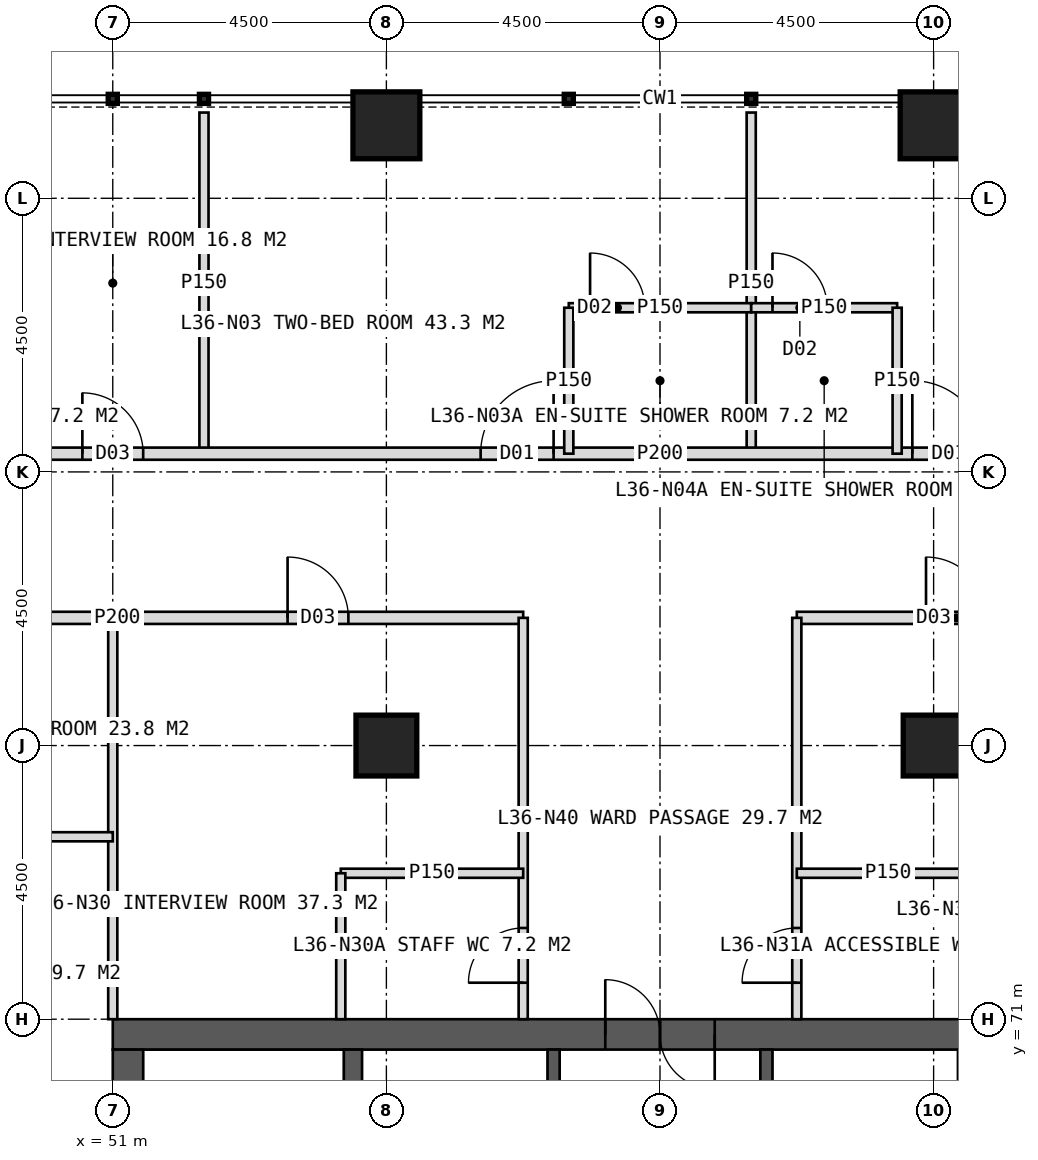
"""IFC4 building model, lengths in metres.
Left out: names, types, materials, properties, quantities, classifications, styles, units other than length and angle.
Written with IfcOpenShell. Run it as: python <this file> out.ifc"""

import sys

from ifc_helpers import new_model, si_unit, direction, frame, frame_2d, origin, origin_2d, place, context, subcontext, project, spatial, rectangle, hollow_rectangle, extrude, element, fill, save


model = new_model("IFC4")
c1 = context("Model", 3, precision=1e-05, world=origin(), true_north=direction((0.0, 1.0)))
c2 = subcontext(c1, "Body", "Model", "MODEL_VIEW")
j1 = project(units=[si_unit("LENGTHUNIT", "METRE"), si_unit("PLANEANGLEUNIT", "RADIAN")], contexts=[c1])
p1 = place(None, origin())
s1 = spatial("IfcSite", under=j1, at=p1, CompositionType="ELEMENT")
p2 = place(p1, origin())
s2 = spatial("IfcBuilding", under=s1, at=p2, CompositionType="ELEMENT")
p3 = place(p2, frame((0.0, 0.0, 152.0)))
s3 = spatial("IfcBuildingStorey", under=s2, at=p3, CompositionType="ELEMENT", Elevation=152.0)
p4 = place(p3, frame((51.0, 70.75, 0.0), z_axis=(0.0, 0.0, 1.0), x_axis=(1.0, 0.0, 0.0)))
e1 = element("IfcWall", 1, at=p4, inside=s3, PredefinedType="SHEAR", context=c2, shape_type="SweptSolid", body=[
    extrude(rectangle(XDim=18.0, YDim=0.5, at=frame_2d((9.0, 0.0))), origin(), (0.0, 0.0, 1.0), 4.0),
])
p5 = place(p4, frame((8.1, 0.0, 0.0)))
e2 = element("IfcOpeningElement", 2, at=p5, cuts=e1, PredefinedType="OPENING", context=c2, shape_type="SweptSolid", body=[
    extrude(rectangle(XDim=1.8, YDim=2.2, at=frame_2d((0.9, 1.1))), frame((0.0, 0.26, 0.0), z_axis=(0.0, -1.0, 0.0), x_axis=(1.0, 0.0, 0.0)), (0.0, 0.0, 1.0), 0.52),
])
p6 = place(p3, frame((51.25, 53.5, 0.0), z_axis=(0.0, 0.0, 1.0), x_axis=(0.0, 1.0, 0.0)))
e3 = element("IfcWall", 3, at=p6, inside=s3, PredefinedType="SHEAR", context=c2, shape_type="SweptSolid", body=[
    extrude(rectangle(XDim=17.0, YDim=0.5, at=frame_2d((8.5, 0.0))), origin(), (0.0, 0.0, 1.0), 4.0),
])
p7 = place(p6, frame((6.0, 0.0, 0.0)))
e4 = element("IfcOpeningElement", 4, at=p7, cuts=e3, PredefinedType="OPENING", context=c2, shape_type="SweptSolid", body=[
    extrude(rectangle(XDim=1.5, YDim=2.2, at=frame_2d((0.75, 1.1))), frame((0.0, 0.26, 0.0), z_axis=(0.0, -1.0, 0.0), x_axis=(1.0, 0.0, 0.0)), (0.0, 0.0, 1.0), 0.52),
])
p8 = place(p3, frame((54.95, 53.5, 0.0), z_axis=(0.0, 0.0, 1.0), x_axis=(0.0, 1.0, 0.0)))
e5 = element("IfcWall", 5, at=p8, inside=s3, PredefinedType="SHEAR", context=c2, shape_type="SweptSolid", body=[
    extrude(rectangle(XDim=17.0, YDim=0.3, at=frame_2d((8.5, 0.0))), origin(), (0.0, 0.0, 1.0), 4.0),
])
p9 = place(p3, frame((58.25, 53.5, 0.0), z_axis=(0.0, 0.0, 1.0), x_axis=(0.0, 1.0, 0.0)))
e6 = element("IfcWall", 6, at=p9, inside=s3, PredefinedType="SHEAR", context=c2, shape_type="SweptSolid", body=[
    extrude(rectangle(XDim=17.0, YDim=0.2, at=frame_2d((8.5, 0.0))), origin(), (0.0, 0.0, 1.0), 4.0),
])
p10 = place(p9, frame((1.375, 0.0, 0.0)))
e7 = element("IfcOpeningElement", 7, at=p10, cuts=e6, PredefinedType="OPENING", context=c2, shape_type="SweptSolid", body=[
    extrude(rectangle(XDim=1.4, YDim=2.2, at=frame_2d((0.7, 1.1))), frame((0.0, 0.11, 0.0), z_axis=(0.0, -1.0, 0.0), x_axis=(1.0, 0.0, 0.0)), (0.0, 0.0, 1.0), 0.22),
])
p11 = place(p9, frame((5.675, 0.0, 0.0)))
e8 = element("IfcOpeningElement", 8, at=p11, cuts=e6, PredefinedType="OPENING", context=c2, shape_type="SweptSolid", body=[
    extrude(rectangle(XDim=1.4, YDim=2.2, at=frame_2d((0.7, 1.1))), frame((0.0, 0.11, 0.0), z_axis=(0.0, -1.0, 0.0), x_axis=(1.0, 0.0, 0.0)), (0.0, 0.0, 1.0), 0.22),
])
p12 = place(p3, frame((61.75, 53.5, 0.0), z_axis=(0.0, 0.0, 1.0), x_axis=(0.0, 1.0, 0.0)))
e9 = element("IfcWall", 9, at=p12, inside=s3, PredefinedType="SHEAR", context=c2, shape_type="SweptSolid", body=[
    extrude(rectangle(XDim=17.0, YDim=0.2, at=frame_2d((8.5, 0.0))), origin(), (0.0, 0.0, 1.0), 4.0),
])
p13 = place(p12, frame((1.375, 0.0, 0.0)))
e10 = element("IfcOpeningElement", 10, at=p13, cuts=e9, PredefinedType="OPENING", context=c2, shape_type="SweptSolid", body=[
    extrude(rectangle(XDim=1.4, YDim=2.2, at=frame_2d((0.7, 1.1))), frame((0.0, 0.11, 0.0), z_axis=(0.0, -1.0, 0.0), x_axis=(1.0, 0.0, 0.0)), (0.0, 0.0, 1.0), 0.22),
])
p14 = place(p12, frame((5.675, 0.0, 0.0)))
e11 = element("IfcOpeningElement", 11, at=p14, cuts=e9, PredefinedType="OPENING", context=c2, shape_type="SweptSolid", body=[
    extrude(rectangle(XDim=1.4, YDim=2.2, at=frame_2d((0.7, 1.1))), frame((0.0, 0.11, 0.0), z_axis=(0.0, -1.0, 0.0), x_axis=(1.0, 0.0, 0.0)), (0.0, 0.0, 1.0), 0.22),
])
for number, where, z_axis, x_axis in (
    (12, (55.5, 75.5, 0.0), (0.0, 0.0, 1.0), (1.0, 0.0, 0.0)),
    (13, (64.5, 75.5, 0.0), (0.0, 0.0, 1.0), (1.0, 0.0, 0.0)),
):
    element("IfcColumn", number, at=place(p3, frame(where, z_axis=z_axis, x_axis=x_axis)), inside=s3, PredefinedType="COLUMN", context=c2, shape_type="SweptSolid", body=[
        extrude(hollow_rectangle(XDim=1.0, YDim=1.0, WallThickness=0.1, at=origin_2d()), origin(), (0.0, 0.0, 1.0), 4.0),
    ])
for number, where, z_axis, x_axis in (
    (14, (55.5, 85.7, 0.0), (0.0, 0.0, 1.0), (1.0, 0.0, 0.0)),
    (15, (64.5, 85.7, 0.0), (0.0, 0.0, 1.0), (1.0, 0.0, 0.0)),
):
    element("IfcColumn", number, at=place(p3, frame(where, z_axis=z_axis, x_axis=x_axis)), inside=s3, PredefinedType="COLUMN", context=c2, shape_type="SweptSolid", body=[
        extrude(hollow_rectangle(XDim=1.1, YDim=1.1, WallThickness=0.1, at=origin_2d()), origin(), (0.0, 0.0, 1.0), 4.0),
    ])
for number, where, z_axis, x_axis in (
    (16, (52.5, 80.3, 0.0), (0.0, 0.0, 1.0), (0.0, 1.0, 0.0)),
    (17, (61.5, 80.3, 0.0), (0.0, 0.0, 1.0), (0.0, 1.0, 0.0)),
):
    element("IfcWall", number, at=place(p3, frame(where, z_axis=z_axis, x_axis=x_axis)), inside=s3, PredefinedType="PARTITIONING", context=c2, shape_type="SweptSolid", body=[
        extrude(rectangle(XDim=5.61, YDim=0.15, at=frame_2d((2.805, 0.0))), origin(), (0.0, 0.0, 1.0), 3.75),
    ])
p15 = place(p3, frame((41.7, 80.3, 0.0), z_axis=(0.0, 0.0, 1.0), x_axis=(1.0, 0.0, 0.0)))
e18 = element("IfcWall", 18, at=p15, inside=s3, PredefinedType="PARTITIONING", context=c2, shape_type="SweptSolid", body=[
    extrude(rectangle(XDim=36.6, YDim=0.2, at=frame_2d((18.3, 0.0))), origin(), (0.0, 0.0, 1.0), 3.75),
])
p16 = place(p15, frame((3.35, 0.0, 0.0)))
e19 = element("IfcOpeningElement", 19, at=p16, cuts=e18, PredefinedType="OPENING", context=c2, shape_type="SweptSolid", body=[
    extrude(rectangle(XDim=1.2, YDim=2.2, at=frame_2d((0.6, 1.1))), frame((0.0, 0.11, 0.0), z_axis=(0.0, -1.0, 0.0), x_axis=(1.0, 0.0, 0.0)), (0.0, 0.0, 1.0), 0.22),
])
p17 = place(p15, frame((8.8, 0.0, 0.0)))
e20 = element("IfcOpeningElement", 20, at=p17, cuts=e18, PredefinedType="OPENING", context=c2, shape_type="SweptSolid", body=[
    extrude(rectangle(XDim=1.0, YDim=2.1, at=frame_2d((0.5, 1.05))), frame((0.0, 0.11, 0.0), z_axis=(0.0, -1.0, 0.0), x_axis=(1.0, 0.0, 0.0)), (0.0, 0.0, 1.0), 0.22),
])
p18 = place(p15, frame((15.35, 0.0, 0.0)))
e21 = element("IfcOpeningElement", 21, at=p18, cuts=e18, PredefinedType="OPENING", context=c2, shape_type="SweptSolid", body=[
    extrude(rectangle(XDim=1.2, YDim=2.2, at=frame_2d((0.6, 1.1))), frame((0.0, 0.11, 0.0), z_axis=(0.0, -1.0, 0.0), x_axis=(1.0, 0.0, 0.0)), (0.0, 0.0, 1.0), 0.22),
])
p19 = place(p15, frame((22.45, 0.0, 0.0)))
e22 = element("IfcOpeningElement", 22, at=p19, cuts=e18, PredefinedType="OPENING", context=c2, shape_type="SweptSolid", body=[
    extrude(rectangle(XDim=1.2, YDim=2.2, at=frame_2d((0.6, 1.1))), frame((0.0, 0.11, 0.0), z_axis=(0.0, -1.0, 0.0), x_axis=(1.0, 0.0, 0.0)), (0.0, 0.0, 1.0), 0.22),
])
p20 = place(p3, frame((58.5, 82.7, 0.0), z_axis=(0.0, 0.0, 1.0), x_axis=(1.0, 0.0, 0.0)))
e23 = element("IfcWall", 23, at=p20, inside=s3, PredefinedType="PARTITIONING", context=c2, shape_type="SweptSolid", body=[
    extrude(rectangle(XDim=3.0, YDim=0.15, at=frame_2d((1.5, 0.0))), origin(), (0.0, 0.0, 1.0), 3.75),
])
p21 = place(p20, frame((0.35, 0.0, 0.0)))
e24 = element("IfcOpeningElement", 24, at=p21, cuts=e23, PredefinedType="OPENING", context=c2, shape_type="SweptSolid", body=[
    extrude(rectangle(XDim=0.9, YDim=2.1, at=frame_2d((0.45, 1.05))), frame((0.0, 0.085, 0.0), z_axis=(0.0, -1.0, 0.0), x_axis=(1.0, 0.0, 0.0)), (0.0, 0.0, 1.0), 0.17),
])
p22 = place(p3, frame((58.5, 80.3, 0.0), z_axis=(0.0, 0.0, 1.0), x_axis=(0.0, 1.0, 0.0)))
e25 = element("IfcWall", 25, at=p22, inside=s3, PredefinedType="PARTITIONING", context=c2, shape_type="SweptSolid", body=[
    extrude(rectangle(XDim=2.4, YDim=0.15, at=frame_2d((1.2, 0.0))), origin(), (0.0, 0.0, 1.0), 3.75),
])
p23 = place(p3, frame((61.5, 82.7, 0.0), z_axis=(0.0, 0.0, 1.0), x_axis=(1.0, 0.0, 0.0)))
e26 = element("IfcWall", 26, at=p23, inside=s3, PredefinedType="PARTITIONING", context=c2, shape_type="SweptSolid", body=[
    extrude(rectangle(XDim=2.4, YDim=0.15, at=frame_2d((1.2, 0.0))), origin(), (0.0, 0.0, 1.0), 3.75),
])
p24 = place(p23, frame((0.35, 0.0, 0.0)))
e27 = element("IfcOpeningElement", 27, at=p24, cuts=e26, PredefinedType="OPENING", context=c2, shape_type="SweptSolid", body=[
    extrude(rectangle(XDim=0.9, YDim=2.1, at=frame_2d((0.45, 1.05))), frame((0.0, 0.085, 0.0), z_axis=(0.0, -1.0, 0.0), x_axis=(1.0, 0.0, 0.0)), (0.0, 0.0, 1.0), 0.17),
])
p25 = place(p3, frame((63.9, 80.3, 0.0), z_axis=(0.0, 0.0, 1.0), x_axis=(0.0, 1.0, 0.0)))
e28 = element("IfcWall", 28, at=p25, inside=s3, PredefinedType="PARTITIONING", context=c2, shape_type="SweptSolid", body=[
    extrude(rectangle(XDim=2.4, YDim=0.15, at=frame_2d((1.2, 0.0))), origin(), (0.0, 0.0, 1.0), 3.75),
])
p26 = place(p3, frame((51.0, 71.0, 0.0), z_axis=(0.0, 0.0, 1.0), x_axis=(0.0, 1.0, 0.0)))
e29 = element("IfcWall", 29, at=p26, inside=s3, PredefinedType="PARTITIONING", context=c2, shape_type="SweptSolid", body=[
    extrude(rectangle(XDim=6.6, YDim=0.15, at=frame_2d((3.3, 0.0))), origin(), (0.0, 0.0, 1.0), 3.75),
])
p27 = place(p3, frame((44.4, 77.6, 0.0), z_axis=(0.0, 0.0, 1.0), x_axis=(1.0, 0.0, 0.0)))
e30 = element("IfcWall", 30, at=p27, inside=s3, PredefinedType="PARTITIONING", context=c2, shape_type="SweptSolid", body=[
    extrude(rectangle(XDim=13.35, YDim=0.2, at=frame_2d((6.675, 0.0))), origin(), (0.0, 0.0, 1.0), 3.75),
])
p28 = place(p27, frame((9.475, 0.0, 0.0)))
e31 = element("IfcOpeningElement", 31, at=p28, cuts=e30, PredefinedType="OPENING", context=c2, shape_type="SweptSolid", body=[
    extrude(rectangle(XDim=1.0, YDim=2.1, at=frame_2d((0.5, 1.05))), frame((0.0, 0.11, 0.0), z_axis=(0.0, -1.0, 0.0), x_axis=(1.0, 0.0, 0.0)), (0.0, 0.0, 1.0), 0.22),
])
p29 = place(p3, frame((62.25, 77.6, 0.0), z_axis=(0.0, 0.0, 1.0), x_axis=(1.0, 0.0, 0.0)))
e32 = element("IfcWall", 32, at=p29, inside=s3, PredefinedType="PARTITIONING", context=c2, shape_type="SweptSolid", body=[
    extrude(rectangle(XDim=6.75, YDim=0.2, at=frame_2d((3.375, 0.0))), origin(), (0.0, 0.0, 1.0), 3.75),
])
p30 = place(p29, frame((2.125, 0.0, 0.0)))
e33 = element("IfcOpeningElement", 33, at=p30, cuts=e32, PredefinedType="OPENING", context=c2, shape_type="SweptSolid", body=[
    extrude(rectangle(XDim=1.0, YDim=2.1, at=frame_2d((0.5, 1.05))), frame((0.0, 0.11, 0.0), z_axis=(0.0, -1.0, 0.0), x_axis=(1.0, 0.0, 0.0)), (0.0, 0.0, 1.0), 0.22),
])
p31 = place(p3, frame((57.75, 71.0, 0.0), z_axis=(0.0, 0.0, 1.0), x_axis=(0.0, 1.0, 0.0)))
e34 = element("IfcWall", 34, at=p31, inside=s3, PredefinedType="PARTITIONING", context=c2, shape_type="SweptSolid", body=[
    extrude(rectangle(XDim=6.6, YDim=0.15, at=frame_2d((3.3, 0.0))), origin(), (0.0, 0.0, 1.0), 3.75),
])
p32 = place(p31, frame((0.6, 0.0, 0.0)))
e35 = element("IfcOpeningElement", 35, at=p32, cuts=e34, PredefinedType="OPENING", context=c2, shape_type="SweptSolid", body=[
    extrude(rectangle(XDim=0.9, YDim=2.1, at=frame_2d((0.45, 1.05))), frame((0.0, 0.085, 0.0), z_axis=(0.0, -1.0, 0.0), x_axis=(1.0, 0.0, 0.0)), (0.0, 0.0, 1.0), 0.17),
])
p33 = place(p3, frame((62.25, 71.0, 0.0), z_axis=(0.0, 0.0, 1.0), x_axis=(0.0, 1.0, 0.0)))
e36 = element("IfcWall", 36, at=p33, inside=s3, PredefinedType="PARTITIONING", context=c2, shape_type="SweptSolid", body=[
    extrude(rectangle(XDim=6.6, YDim=0.15, at=frame_2d((3.3, 0.0))), origin(), (0.0, 0.0, 1.0), 3.75),
])
p34 = place(p33, frame((0.6, 0.0, 0.0)))
e37 = element("IfcOpeningElement", 37, at=p34, cuts=e36, PredefinedType="OPENING", context=c2, shape_type="SweptSolid", body=[
    extrude(rectangle(XDim=0.9, YDim=2.1, at=frame_2d((0.45, 1.05))), frame((0.0, 0.085, 0.0), z_axis=(0.0, -1.0, 0.0), x_axis=(1.0, 0.0, 0.0)), (0.0, 0.0, 1.0), 0.17),
])
p35 = place(p3, frame((54.75, 73.4, 0.0), z_axis=(0.0, 0.0, 1.0), x_axis=(1.0, 0.0, 0.0)))
e38 = element("IfcWall", 38, at=p35, inside=s3, PredefinedType="PARTITIONING", context=c2, shape_type="SweptSolid", body=[
    extrude(rectangle(XDim=3.0, YDim=0.15, at=frame_2d((1.5, 0.0))), origin(), (0.0, 0.0, 1.0), 3.75),
])
p36 = place(p3, frame((54.75, 71.0, 0.0), z_axis=(0.0, 0.0, 1.0), x_axis=(0.0, 1.0, 0.0)))
e39 = element("IfcWall", 39, at=p36, inside=s3, PredefinedType="PARTITIONING", context=c2, shape_type="SweptSolid", body=[
    extrude(rectangle(XDim=2.4, YDim=0.15, at=frame_2d((1.2, 0.0))), origin(), (0.0, 0.0, 1.0), 3.75),
])
p37 = place(p3, frame((62.25, 73.4, 0.0), z_axis=(0.0, 0.0, 1.0), x_axis=(1.0, 0.0, 0.0)))
e40 = element("IfcWall", 40, at=p37, inside=s3, PredefinedType="PARTITIONING", context=c2, shape_type="SweptSolid", body=[
    extrude(rectangle(XDim=3.0, YDim=0.15, at=frame_2d((1.5, 0.0))), origin(), (0.0, 0.0, 1.0), 3.75),
])
p38 = place(p3, frame((51.0, 74.0, 0.0), z_axis=(0.0, 0.0, 1.0), x_axis=(-1.0, 0.0, 0.0)))
e41 = element("IfcWall", 41, at=p38, inside=s3, PredefinedType="PARTITIONING", context=c2, shape_type="SweptSolid", body=[
    extrude(rectangle(XDim=6.6, YDim=0.15, at=frame_2d((3.3, 0.0))), origin(), (0.0, 0.0, 1.0), 3.75),
])
p39 = place(p17, origin())
e42 = element("IfcDoor", 42, at=p39, inside=s3, OperationType="SINGLE_SWING_LEFT", PredefinedType="DOOR", context=c2, shape_type="SweptSolid", body=[
    extrude(rectangle(XDim=1.0, YDim=2.1, at=frame_2d((0.5, 1.05))), frame((0.0, 0.025, 0.0), z_axis=(0.0, -1.0, 0.0), x_axis=(1.0, 0.0, 0.0)), (0.0, 0.0, 1.0), 0.05),
])
fill(e20, e42)
p40 = place(p18, origin())
e43 = element("IfcDoor", 43, at=p40, inside=s3, OperationType="SINGLE_SWING_RIGHT", PredefinedType="DOOR", context=c2, shape_type="SweptSolid", body=[
    extrude(rectangle(XDim=1.2, YDim=2.2, at=frame_2d((0.6, 1.1))), frame((0.0, 0.025, 0.0), z_axis=(0.0, -1.0, 0.0), x_axis=(1.0, 0.0, 0.0)), (0.0, 0.0, 1.0), 0.05),
])
fill(e21, e43)
p41 = place(p21, origin())
e44 = element("IfcDoor", 44, at=p41, inside=s3, OperationType="SINGLE_SWING_LEFT", PredefinedType="DOOR", context=c2, shape_type="SweptSolid", body=[
    extrude(rectangle(XDim=0.9, YDim=2.1, at=frame_2d((0.45, 1.05))), frame((0.0, 0.025, 0.0), z_axis=(0.0, -1.0, 0.0), x_axis=(1.0, 0.0, 0.0)), (0.0, 0.0, 1.0), 0.05),
])
fill(e24, e44)
p42 = place(p19, origin())
e45 = element("IfcDoor", 45, at=p42, inside=s3, OperationType="SINGLE_SWING_LEFT", PredefinedType="DOOR", context=c2, shape_type="SweptSolid", body=[
    extrude(rectangle(XDim=1.2, YDim=2.2, at=frame_2d((0.6, 1.1))), frame((0.0, 0.025, 0.0), z_axis=(0.0, -1.0, 0.0), x_axis=(1.0, 0.0, 0.0)), (0.0, 0.0, 1.0), 0.05),
])
fill(e22, e45)
p43 = place(p24, origin())
e46 = element("IfcDoor", 46, at=p43, inside=s3, OperationType="SINGLE_SWING_LEFT", PredefinedType="DOOR", context=c2, shape_type="SweptSolid", body=[
    extrude(rectangle(XDim=0.9, YDim=2.1, at=frame_2d((0.45, 1.05))), frame((0.0, 0.025, 0.0), z_axis=(0.0, -1.0, 0.0), x_axis=(1.0, 0.0, 0.0)), (0.0, 0.0, 1.0), 0.05),
])
fill(e27, e46)
p44 = place(p32, origin())
e47 = element("IfcDoor", 47, at=p44, inside=s3, OperationType="SINGLE_SWING_LEFT", PredefinedType="DOOR", context=c2, shape_type="SweptSolid", body=[
    extrude(rectangle(XDim=0.9, YDim=2.1, at=frame_2d((0.45, 1.05))), frame((0.0, 0.025, 0.0), z_axis=(0.0, -1.0, 0.0), x_axis=(1.0, 0.0, 0.0)), (0.0, 0.0, 1.0), 0.05),
])
fill(e35, e47)
p45 = place(p28, origin())
e48 = element("IfcDoor", 48, at=p45, inside=s3, OperationType="SINGLE_SWING_LEFT", PredefinedType="DOOR", context=c2, shape_type="SweptSolid", body=[
    extrude(rectangle(XDim=1.0, YDim=2.1, at=frame_2d((0.5, 1.05))), frame((0.0, 0.025, 0.0), z_axis=(0.0, -1.0, 0.0), x_axis=(1.0, 0.0, 0.0)), (0.0, 0.0, 1.0), 0.05),
])
fill(e31, e48)
p46 = place(p34, origin())
e49 = element("IfcDoor", 49, at=p46, inside=s3, OperationType="SINGLE_SWING_LEFT", PredefinedType="DOOR", context=c2, shape_type="SweptSolid", body=[
    extrude(rectangle(XDim=0.9, YDim=2.1, at=frame_2d((0.45, 1.05))), frame((0.0, 0.025, 0.0), z_axis=(0.0, -1.0, 0.0), x_axis=(1.0, 0.0, 0.0)), (0.0, 0.0, 1.0), 0.05),
])
fill(e37, e49)
p47 = place(p30, origin())
e50 = element("IfcDoor", 50, at=p47, inside=s3, OperationType="SINGLE_SWING_LEFT", PredefinedType="DOOR", context=c2, shape_type="SweptSolid", body=[
    extrude(rectangle(XDim=1.0, YDim=2.1, at=frame_2d((0.5, 1.05))), frame((0.0, 0.025, 0.0), z_axis=(0.0, -1.0, 0.0), x_axis=(1.0, 0.0, 0.0)), (0.0, 0.0, 1.0), 0.05),
])
fill(e33, e50)
p48 = place(p5, origin())
e51 = element("IfcDoor", 51, at=p48, inside=s3, OperationType="DOUBLE_DOOR_SINGLE_SWING", PredefinedType="DOOR", context=c2, shape_type="SweptSolid", body=[
    extrude(rectangle(XDim=1.8, YDim=2.2, at=frame_2d((0.9, 1.1))), frame((0.0, 0.025, 0.0), z_axis=(0.0, -1.0, 0.0), x_axis=(1.0, 0.0, 0.0)), (0.0, 0.0, 1.0), 0.05),
])
fill(e2, e51)
save(model, sys.argv[1])
